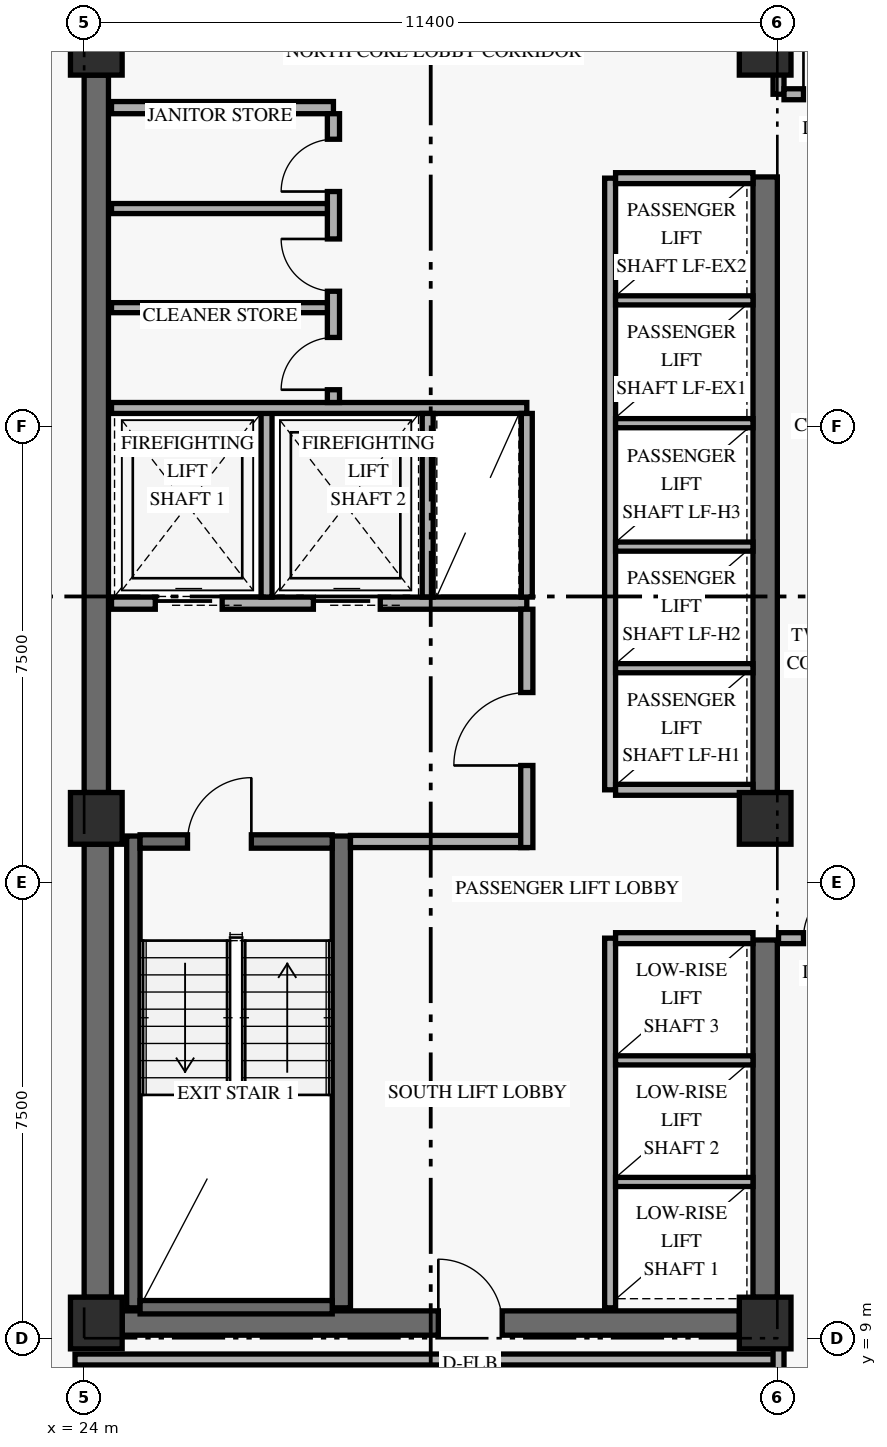
"""IFC4 building model, lengths in metres.
Left out: names, types, materials, properties, quantities, classifications, styles, units other than length and angle.
Written with IfcOpenShell. Run it as: python <this file> out.ifc"""

import sys

from ifc_helpers import new_model, si_unit, direction, frame, frame_2d, origin, origin_2d, place, context, subcontext, project, spatial, rectangle, extrude, element, fill, save


model = new_model("IFC4")
c1 = context("Model", 3, precision=1e-05, world=origin(), true_north=direction((0.0, 1.0)))
c2 = subcontext(c1, "Body", "Model", "MODEL_VIEW")
j1 = project(units=[si_unit("LENGTHUNIT", "METRE"), si_unit("PLANEANGLEUNIT", "RADIAN")], contexts=[c1])
p1 = place(None, origin())
s1 = spatial("IfcSite", under=j1, at=p1, CompositionType="ELEMENT")
p2 = place(p1, origin())
s2 = spatial("IfcBuilding", under=s1, at=p2, CompositionType="ELEMENT")
p3 = place(p2, frame((0.0, 0.0, 102.6)))
s3 = spatial("IfcBuildingStorey", under=s2, at=p3, CompositionType="ELEMENT", Elevation=102.6)
p4 = place(p3, frame((24.225, 9.675, 0.0), z_axis=(0.0, 0.0, 1.0), x_axis=(0.0, 1.0, 0.0)))
e1 = element("IfcWall", 1, at=p4, inside=s3, PredefinedType="SHEAR", context=c2, shape_type="SweptSolid", body=[
    extrude(rectangle(XDim=7.45, YDim=0.45, at=frame_2d((3.725, 0.0))), origin(), (0.0, 0.0, 1.0), 2.749),
])
p5 = place(p3, frame((24.2, 17.975, 0.0), z_axis=(0.0, 0.0, 1.0), x_axis=(0.0, 1.0, 0.0)))
e2 = element("IfcWall", 2, at=p5, inside=s3, PredefinedType="SHEAR", context=c2, shape_type="SweptSolid", body=[
    extrude(rectangle(XDim=11.8, YDim=0.4, at=frame_2d((5.9, 0.0))), origin(), (0.0, 0.0, 1.0), 2.749),
])
p6 = place(p3, frame((35.2, 9.675, 0.0), z_axis=(0.0, 0.0, 1.0), x_axis=(0.0, 1.0, 0.0)))
e3 = element("IfcWall", 3, at=p6, inside=s3, PredefinedType="SHEAR", context=c2, shape_type="SweptSolid", body=[
    extrude(rectangle(XDim=5.875, YDim=0.4, at=frame_2d((2.938, 0.0))), origin(), (0.0, 0.0, 1.0), 2.749),
])
p7 = place(p3, frame((35.2, 17.975, 0.0), z_axis=(0.0, 0.0, 1.0), x_axis=(0.0, 1.0, 0.0)))
e4 = element("IfcWall", 4, at=p7, inside=s3, PredefinedType="SHEAR", context=c2, shape_type="SweptSolid", body=[
    extrude(rectangle(XDim=10.125, YDim=0.4, at=frame_2d((5.062, 0.0))), origin(), (0.0, 0.0, 1.0), 2.749),
])
p8 = place(p3, frame((24.625, 9.25, 0.0), z_axis=(0.0, 0.0, 1.0), x_axis=(1.0, 0.0, 0.0)))
e5 = element("IfcWall", 5, at=p8, inside=s3, PredefinedType="SHEAR", context=c2, shape_type="SweptSolid", body=[
    extrude(rectangle(XDim=10.15, YDim=0.4, at=frame_2d((5.075, 0.0))), origin(), (0.0, 0.0, 1.0), 3.36),
])
p9 = place(p8, frame((5.2, 0.0, 0.0)))
e6 = element("IfcOpeningElement", 6, at=p9, cuts=e5, PredefinedType="OPENING", context=c2, shape_type="SweptSolid", body=[
    extrude(rectangle(XDim=1.05, YDim=2.15, at=frame_2d((0.525, 1.075))), frame((0.0, 0.21, 0.0), z_axis=(0.0, -1.0, 0.0), x_axis=(1.0, 0.0, 0.0)), (0.0, 0.0, 1.0), 0.42),
])
p10 = place(p3, frame((24.81, 9.5, 0.0), z_axis=(0.0, 0.0, 1.0), x_axis=(0.0, 1.0, 0.0)))
e7 = element("IfcWall", 7, at=p10, inside=s3, PredefinedType="SHEAR", context=c2, shape_type="SweptSolid", body=[
    extrude(rectangle(XDim=7.76, YDim=0.22, at=frame_2d((3.88, 0.0))), origin(), (0.0, 0.0, 1.0), 3.36),
])
p11 = place(p3, frame((28.23, 9.5, 0.0), z_axis=(0.0, 0.0, 1.0), x_axis=(0.0, 1.0, 0.0)))
e8 = element("IfcWall", 8, at=p11, inside=s3, PredefinedType="SHEAR", context=c2, shape_type="SweptSolid", body=[
    extrude(rectangle(XDim=7.76, YDim=0.3, at=frame_2d((3.88, 0.0))), origin(), (0.0, 0.0, 1.0), 3.36),
])
p12 = place(p3, frame((24.92, 9.51, 0.0), z_axis=(0.0, 0.0, 1.0), x_axis=(1.0, 0.0, 0.0)))
e9 = element("IfcWall", 9, at=p12, inside=s3, PredefinedType="SHEAR", context=c2, shape_type="SweptSolid", body=[
    extrude(rectangle(XDim=3.16, YDim=0.22, at=frame_2d((1.58, 0.0))), origin(), (0.0, 0.0, 1.0), 3.36),
])
p13 = place(p3, frame((24.92, 17.17, 0.0), z_axis=(0.0, 0.0, 1.0), x_axis=(1.0, 0.0, 0.0)))
e10 = element("IfcWall", 10, at=p13, inside=s3, PredefinedType="SHEAR", context=c2, shape_type="SweptSolid", body=[
    extrude(rectangle(XDim=3.16, YDim=0.22, at=frame_2d((1.58, 0.0))), origin(), (0.0, 0.0, 1.0), 3.36),
])
p14 = place(p13, frame((0.78, 0.0, 0.0)))
e11 = element("IfcOpeningElement", 11, at=p14, cuts=e10, PredefinedType="OPENING", context=c2, shape_type="SweptSolid", body=[
    extrude(rectangle(XDim=1.05, YDim=2.15, at=frame_2d((0.525, 1.075))), frame((0.0, 0.12, 0.0), z_axis=(0.0, -1.0, 0.0), x_axis=(1.0, 0.0, 0.0)), (0.0, 0.0, 1.0), 0.24),
])
for number, where, z_axis, x_axis in (
    (12, (24.2, 9.25, 0.0), (0.0, 0.0, 1.0), (1.0, 0.0, 0.0)),
    (13, (24.2, 17.55, 0.0), (0.0, 0.0, 1.0), (1.0, 0.0, 0.0)),
    (14, (24.2, 30.2, 0.0), (0.0, 0.0, 1.0), (1.0, 0.0, 0.0)),
    (15, (35.2, 9.25, 0.0), (0.0, 0.0, 1.0), (1.0, 0.0, 0.0)),
    (16, (35.2, 17.55, 0.0), (0.0, 0.0, 1.0), (1.0, 0.0, 0.0)),
    (17, (35.2, 30.2, 0.0), (0.0, 0.0, 1.0), (1.0, 0.0, 0.0)),
):
    element("IfcColumn", number, at=place(p3, frame(where, z_axis=z_axis, x_axis=x_axis)), inside=s3, PredefinedType="COLUMN", context=c2, shape_type="SweptSolid", body=[
        extrude(rectangle(XDim=0.85, YDim=0.85, at=origin_2d()), origin(), (0.0, 0.0, 1.0), 3.6),
    ])
p15 = place(p3, frame((24.45, 21.09, 0.0), z_axis=(0.0, 0.0, 1.0), x_axis=(1.0, 0.0, 0.0)))
e18 = element("IfcWall", 18, at=p15, inside=s3, PredefinedType="STANDARD", context=c2, shape_type="SweptSolid", body=[
    extrude(rectangle(XDim=6.83, YDim=0.2, at=frame_2d((3.415, 0.0))), origin(), (0.0, 0.0, 1.0), 3.36),
])
p16 = place(p15, frame((0.72, 0.0, 0.0)))
e19 = element("IfcOpeningElement", 19, at=p16, cuts=e18, PredefinedType="OPENING", context=c2, shape_type="SweptSolid", body=[
    extrude(rectangle(XDim=1.1, YDim=2.2, at=frame_2d((0.55, 1.1))), frame((0.0, 0.11, 0.0), z_axis=(0.0, -1.0, 0.0), x_axis=(1.0, 0.0, 0.0)), (0.0, 0.0, 1.0), 0.22),
])
p17 = place(p15, frame((3.32, 0.0, 0.0)))
e20 = element("IfcOpeningElement", 20, at=p17, cuts=e18, PredefinedType="OPENING", context=c2, shape_type="SweptSolid", body=[
    extrude(rectangle(XDim=1.1, YDim=2.2, at=frame_2d((0.55, 1.1))), frame((0.0, 0.11, 0.0), z_axis=(0.0, -1.0, 0.0), x_axis=(1.0, 0.0, 0.0)), (0.0, 0.0, 1.0), 0.22),
])
p18 = place(p3, frame((28.38, 17.17, 0.0), z_axis=(0.0, 0.0, 1.0), x_axis=(1.0, 0.0, 0.0)))
e21 = element("IfcWall", 21, at=p18, inside=s3, PredefinedType="STANDARD", context=c2, shape_type="SweptSolid", body=[
    extrude(rectangle(XDim=2.9, YDim=0.2, at=frame_2d((1.45, 0.0))), origin(), (0.0, 0.0, 1.0), 3.36),
])
p19 = place(p3, frame((31.28, 17.07, 0.0), z_axis=(0.0, 0.0, 1.0), x_axis=(0.0, 1.0, 0.0)))
e22 = element("IfcWall", 22, at=p19, inside=s3, PredefinedType="STANDARD", context=c2, shape_type="SweptSolid", body=[
    extrude(rectangle(XDim=3.92, YDim=0.2, at=frame_2d((1.96, 0.0))), origin(), (0.0, 0.0, 1.0), 2.731),
])
p20 = place(p19, frame((1.35, 0.0, 0.0)))
e23 = element("IfcOpeningElement", 23, at=p20, cuts=e22, PredefinedType="OPENING", context=c2, shape_type="SweptSolid", body=[
    extrude(rectangle(XDim=1.2, YDim=2.15, at=frame_2d((0.6, 1.075))), frame((0.0, 0.11, 0.0), z_axis=(0.0, -1.0, 0.0), x_axis=(1.0, 0.0, 0.0)), (0.0, 0.0, 1.0), 0.22),
])
p21 = place(p3, frame((27.0, 21.19, 0.0), z_axis=(0.0, 0.0, 1.0), x_axis=(0.0, 1.0, 0.0)))
e24 = element("IfcWall", 24, at=p21, inside=s3, PredefinedType="STANDARD", context=c2, shape_type="SweptSolid", body=[
    extrude(rectangle(XDim=3.11, YDim=0.18, at=frame_2d((1.555, 0.0))), origin(), (0.0, 0.0, 1.0), 3.36),
])
p22 = place(p3, frame((24.45, 24.3, 0.0), z_axis=(0.0, 0.0, 1.0), x_axis=(1.0, 0.0, 0.0)))
e25 = element("IfcWall", 25, at=p22, inside=s3, PredefinedType="STANDARD", context=c2, shape_type="SweptSolid", body=[
    extrude(rectangle(XDim=6.83, YDim=0.18, at=frame_2d((3.415, 0.0))), origin(), (0.0, 0.0, 1.0), 3.36),
])
for number, where, z_axis, x_axis in (
    (26, (29.65, 21.19, 0.0), (0.0, 0.0, 1.0), (0.0, 1.0, 0.0)),
    (27, (31.28, 21.19, 0.0), (0.0, 0.0, 1.0), (0.0, 1.0, 0.0)),
):
    element("IfcWall", number, at=place(p3, frame(where, z_axis=z_axis, x_axis=x_axis)), inside=s3, PredefinedType="STANDARD", context=c2, shape_type="SweptSolid", body=[
        extrude(rectangle(XDim=3.02, YDim=0.18, at=frame_2d((1.51, 0.0))), origin(), (0.0, 0.0, 1.0), 3.36),
    ])
p23 = place(p3, frame((24.45, 29.24, 0.0), z_axis=(0.0, 0.0, 1.0), x_axis=(1.0, 0.0, 0.0)))
e28 = element("IfcWall", 28, at=p23, inside=s3, PredefinedType="STANDARD", context=c2, shape_type="SweptSolid", body=[
    extrude(rectangle(XDim=3.65, YDim=0.2, at=frame_2d((1.825, 0.0))), origin(), (0.0, 0.0, 1.0), 3.36),
])
p24 = place(p3, frame((28.1, 24.39, 0.0), z_axis=(0.0, 0.0, 1.0), x_axis=(0.0, 1.0, 0.0)))
e29 = element("IfcWall", 29, at=p24, inside=s3, PredefinedType="STANDARD", context=c2, shape_type="SweptSolid", body=[
    extrude(rectangle(XDim=4.75, YDim=0.2, at=frame_2d((2.375, 0.0))), origin(), (0.0, 0.0, 1.0), 3.36),
])
p25 = place(p24, frame((0.21, 0.0, 0.0)))
e30 = element("IfcOpeningElement", 30, at=p25, cuts=e29, PredefinedType="OPENING", context=c2, shape_type="SweptSolid", body=[
    extrude(rectangle(XDim=0.86, YDim=2.1, at=frame_2d((0.43, 1.05))), frame((0.0, 0.11, 0.0), z_axis=(0.0, -1.0, 0.0), x_axis=(1.0, 0.0, 0.0)), (0.0, 0.0, 1.0), 0.22),
])
p26 = place(p24, frame((1.83, 0.0, 0.0)))
e31 = element("IfcOpeningElement", 31, at=p26, cuts=e29, PredefinedType="OPENING", context=c2, shape_type="SweptSolid", body=[
    extrude(rectangle(XDim=0.86, YDim=2.1, at=frame_2d((0.43, 1.05))), frame((0.0, 0.11, 0.0), z_axis=(0.0, -1.0, 0.0), x_axis=(1.0, 0.0, 0.0)), (0.0, 0.0, 1.0), 0.22),
])
p27 = place(p24, frame((3.47, 0.0, 0.0)))
e32 = element("IfcOpeningElement", 32, at=p27, cuts=e29, PredefinedType="OPENING", context=c2, shape_type="SweptSolid", body=[
    extrude(rectangle(XDim=0.86, YDim=2.1, at=frame_2d((0.43, 1.05))), frame((0.0, 0.11, 0.0), z_axis=(0.0, -1.0, 0.0), x_axis=(1.0, 0.0, 0.0)), (0.0, 0.0, 1.0), 0.22),
])
for number, where, z_axis, x_axis in (
    (33, (24.45, 25.95, 0.0), (0.0, 0.0, 1.0), (1.0, 0.0, 0.0)),
    (34, (24.45, 27.58, 0.0), (0.0, 0.0, 1.0), (1.0, 0.0, 0.0)),
):
    element("IfcWall", number, at=place(p3, frame(where, z_axis=z_axis, x_axis=x_axis)), inside=s3, PredefinedType="PARTITIONING", context=c2, shape_type="SweptSolid", body=[
        extrude(rectangle(XDim=3.55, YDim=0.165, at=frame_2d((1.775, 0.0))), origin(), (0.0, 0.0, 1.0), 3.36),
    ])
p28 = place(p3, frame((32.65, 9.5, 0.0), z_axis=(0.0, 0.0, 1.0), x_axis=(0.0, 1.0, 0.0)))
e35 = element("IfcWall", 35, at=p28, inside=s3, PredefinedType="STANDARD", context=c2, shape_type="SweptSolid", body=[
    extrude(rectangle(XDim=6.08, YDim=0.18, at=frame_2d((3.04, 0.0))), origin(), (0.0, 0.0, 1.0), 3.36),
])
p29 = place(p3, frame((32.74, 15.58, 0.0), z_axis=(0.0, 0.0, 1.0), x_axis=(1.0, 0.0, 0.0)))
e36 = element("IfcWall", 36, at=p29, inside=s3, PredefinedType="STANDARD", context=c2, shape_type="SweptSolid", body=[
    extrude(rectangle(XDim=2.26, YDim=0.18, at=frame_2d((1.13, 0.0))), origin(), (0.0, 0.0, 1.0), 3.36),
])
for number, where, z_axis, x_axis in (
    (37, (32.74, 11.57, 0.0), (0.0, 0.0, 1.0), (1.0, 0.0, 0.0)),
    (38, (32.74, 13.57, 0.0), (0.0, 0.0, 1.0), (1.0, 0.0, 0.0)),
):
    element("IfcWall", number, at=place(p3, frame(where, z_axis=z_axis, x_axis=x_axis)), inside=s3, PredefinedType="STANDARD", context=c2, shape_type="SweptSolid", body=[
        extrude(rectangle(XDim=2.26, YDim=0.15, at=frame_2d((1.13, 0.0))), origin(), (0.0, 0.0, 1.0), 3.36),
    ])
p30 = place(p3, frame((32.65, 18.02, 0.0), z_axis=(0.0, 0.0, 1.0), x_axis=(0.0, 1.0, 0.0)))
e39 = element("IfcWall", 39, at=p30, inside=s3, PredefinedType="STANDARD", context=c2, shape_type="SweptSolid", body=[
    extrude(rectangle(XDim=10.06, YDim=0.18, at=frame_2d((5.03, 0.0))), origin(), (0.0, 0.0, 1.0), 3.36),
])
for number, where, z_axis, x_axis in (
    (40, (32.74, 18.02, 0.0), (0.0, 0.0, 1.0), (1.0, 0.0, 0.0)),
    (41, (32.74, 28.08, 0.0), (0.0, 0.0, 1.0), (1.0, 0.0, 0.0)),
):
    element("IfcWall", number, at=place(p3, frame(where, z_axis=z_axis, x_axis=x_axis)), inside=s3, PredefinedType="STANDARD", context=c2, shape_type="SweptSolid", body=[
        extrude(rectangle(XDim=2.26, YDim=0.18, at=frame_2d((1.13, 0.0))), origin(), (0.0, 0.0, 1.0), 3.36),
    ])
for number, where, z_axis, x_axis in (
    (42, (32.74, 20.02, 0.0), (0.0, 0.0, 1.0), (1.0, 0.0, 0.0)),
    (43, (32.74, 22.02, 0.0), (0.0, 0.0, 1.0), (1.0, 0.0, 0.0)),
    (44, (32.74, 24.05, 0.0), (0.0, 0.0, 1.0), (1.0, 0.0, 0.0)),
    (45, (32.74, 26.07, 0.0), (0.0, 0.0, 1.0), (1.0, 0.0, 0.0)),
):
    element("IfcWall", number, at=place(p3, frame(where, z_axis=z_axis, x_axis=x_axis)), inside=s3, PredefinedType="STANDARD", context=c2, shape_type="SweptSolid", body=[
        extrude(rectangle(XDim=2.26, YDim=0.15, at=frame_2d((1.13, 0.0))), origin(), (0.0, 0.0, 1.0), 3.36),
    ])
p31 = place(p3, frame((35.42, 15.58, 0.0), z_axis=(0.0, 0.0, 1.0), x_axis=(1.0, 0.0, 0.0)))
e46 = element("IfcWall", 46, at=p31, inside=s3, PredefinedType="STANDARD", context=c2, shape_type="SweptSolid", body=[
    extrude(rectangle(XDim=11.18, YDim=0.18, at=frame_2d((5.59, 0.0))), origin(), (0.0, 0.0, 1.0), 2.731),
])
p32 = place(p31, frame((0.41, 0.0, 0.0)))
e47 = element("IfcOpeningElement", 47, at=p32, cuts=e46, PredefinedType="OPENING", context=c2, shape_type="SweptSolid", body=[
    extrude(rectangle(XDim=0.92, YDim=2.15, at=frame_2d((0.46, 1.075))), frame((0.0, 0.1, 0.0), z_axis=(0.0, -1.0, 0.0), x_axis=(1.0, 0.0, 0.0)), (0.0, 0.0, 1.0), 0.2),
])
p33 = place(p3, frame((35.42, 29.46, 0.0), z_axis=(0.0, 0.0, 1.0), x_axis=(0.0, 1.0, 0.0)))
e48 = element("IfcWall", 48, at=p33, inside=s3, PredefinedType="STANDARD", context=c2, shape_type="SweptSolid", body=[
    extrude(rectangle(XDim=1.89, YDim=0.18, at=frame_2d((0.945, 0.0))), origin(), (0.0, 0.0, 1.0), 2.731),
])
p34 = place(p3, frame((35.51, 29.46, 0.0), z_axis=(0.0, 0.0, 1.0), x_axis=(1.0, 0.0, 0.0)))
e49 = element("IfcWall", 49, at=p34, inside=s3, PredefinedType="STANDARD", context=c2, shape_type="SweptSolid", body=[
    extrude(rectangle(XDim=11.09, YDim=0.18, at=frame_2d((5.545, 0.0))), origin(), (0.0, 0.0, 1.0), 2.731),
])
p35 = place(p34, frame((0.32, 0.0, 0.0)))
e50 = element("IfcOpeningElement", 50, at=p35, cuts=e49, PredefinedType="OPENING", context=c2, shape_type="SweptSolid", body=[
    extrude(rectangle(XDim=0.92, YDim=2.15, at=frame_2d((0.46, 1.075))), frame((0.0, 0.1, 0.0), z_axis=(0.0, -1.0, 0.0), x_axis=(1.0, 0.0, 0.0)), (0.0, 0.0, 1.0), 0.2),
])
p36 = place(p3, frame((23.85, 8.65, 0.0), z_axis=(0.0, 0.0, 1.0), x_axis=(1.0, 0.0, 0.0)))
e51 = element("IfcWall", 51, at=p36, inside=s3, PredefinedType="STANDARD", context=c2, shape_type="SweptSolid", body=[
    extrude(rectangle(XDim=11.57, YDim=0.18, at=frame_2d((5.785, 0.0))), origin(), (0.0, 0.0, 1.0), 2.731),
])
p37 = place(p3, frame((35.42, 2.98, 0.0), z_axis=(0.0, 0.0, 1.0), x_axis=(0.0, 1.0, 0.0)))
e52 = element("IfcWall", 52, at=p37, inside=s3, PredefinedType="PARTITIONING", context=c2, shape_type="SweptSolid", body=[
    extrude(rectangle(XDim=6.27, YDim=0.18, at=frame_2d((3.135, 0.0))), origin(), (0.0, 0.0, 1.0), 2.731),
])
p38 = place(p14, frame((1.05, 0.0, 0.0), z_axis=(0.0, 0.0, 1.0), x_axis=(-1.0, 0.0, 0.0)))
e53 = element("IfcDoor", 53, at=p38, inside=s3, OperationType="SINGLE_SWING_LEFT", PredefinedType="DOOR", context=c2, shape_type="SweptSolid", body=[
    extrude(rectangle(XDim=1.05, YDim=2.15, at=frame_2d((0.525, 1.075))), frame((0.0, 0.025, 0.0), z_axis=(0.0, -1.0, 0.0), x_axis=(1.0, 0.0, 0.0)), (0.0, 0.0, 1.0), 0.05),
])
fill(e11, e53)
p39 = place(p16, origin())
e54 = element("IfcDoor", 54, at=p39, inside=s3, OperationType="SLIDING_TO_LEFT", PredefinedType="DOOR", context=c2, shape_type="SweptSolid", body=[
    extrude(rectangle(XDim=1.1, YDim=2.2, at=frame_2d((0.55, 1.1))), frame((0.0, 0.025, 0.0), z_axis=(0.0, -1.0, 0.0), x_axis=(1.0, 0.0, 0.0)), (0.0, 0.0, 1.0), 0.05),
])
fill(e19, e54)
p40 = place(p17, origin())
e55 = element("IfcDoor", 55, at=p40, inside=s3, OperationType="SLIDING_TO_LEFT", PredefinedType="DOOR", context=c2, shape_type="SweptSolid", body=[
    extrude(rectangle(XDim=1.1, YDim=2.2, at=frame_2d((0.55, 1.1))), frame((0.0, 0.025, 0.0), z_axis=(0.0, -1.0, 0.0), x_axis=(1.0, 0.0, 0.0)), (0.0, 0.0, 1.0), 0.05),
])
fill(e20, e55)
p41 = place(p20, origin())
e56 = element("IfcDoor", 56, at=p41, inside=s3, OperationType="SINGLE_SWING_LEFT", PredefinedType="DOOR", context=c2, shape_type="SweptSolid", body=[
    extrude(rectangle(XDim=1.2, YDim=2.15, at=frame_2d((0.6, 1.075))), frame((0.0, 0.025, 0.0), z_axis=(0.0, -1.0, 0.0), x_axis=(1.0, 0.0, 0.0)), (0.0, 0.0, 1.0), 0.05),
])
fill(e23, e56)
p42 = place(p25, origin())
e57 = element("IfcDoor", 57, at=p42, inside=s3, OperationType="SINGLE_SWING_LEFT", PredefinedType="DOOR", context=c2, shape_type="SweptSolid", body=[
    extrude(rectangle(XDim=0.86, YDim=2.1, at=frame_2d((0.43, 1.05))), frame((0.0, 0.025, 0.0), z_axis=(0.0, -1.0, 0.0), x_axis=(1.0, 0.0, 0.0)), (0.0, 0.0, 1.0), 0.05),
])
fill(e30, e57)
p43 = place(p26, origin())
e58 = element("IfcDoor", 58, at=p43, inside=s3, OperationType="SINGLE_SWING_RIGHT", PredefinedType="DOOR", context=c2, shape_type="SweptSolid", body=[
    extrude(rectangle(XDim=0.86, YDim=2.1, at=frame_2d((0.43, 1.05))), frame((0.0, 0.025, 0.0), z_axis=(0.0, -1.0, 0.0), x_axis=(1.0, 0.0, 0.0)), (0.0, 0.0, 1.0), 0.05),
])
fill(e31, e58)
p44 = place(p27, origin())
e59 = element("IfcDoor", 59, at=p44, inside=s3, OperationType="SINGLE_SWING_LEFT", PredefinedType="DOOR", context=c2, shape_type="SweptSolid", body=[
    extrude(rectangle(XDim=0.86, YDim=2.1, at=frame_2d((0.43, 1.05))), frame((0.0, 0.025, 0.0), z_axis=(0.0, -1.0, 0.0), x_axis=(1.0, 0.0, 0.0)), (0.0, 0.0, 1.0), 0.05),
])
fill(e32, e59)
p45 = place(p9, origin())
e60 = element("IfcDoor", 60, at=p45, inside=s3, OperationType="SINGLE_SWING_LEFT", PredefinedType="DOOR", context=c2, shape_type="SweptSolid", body=[
    extrude(rectangle(XDim=1.05, YDim=2.15, at=frame_2d((0.525, 1.075))), frame((0.0, 0.025, 0.0), z_axis=(0.0, -1.0, 0.0), x_axis=(1.0, 0.0, 0.0)), (0.0, 0.0, 1.0), 0.05),
])
fill(e6, e60)
p46 = place(p32, origin())
e61 = element("IfcDoor", 61, at=p46, inside=s3, OperationType="SINGLE_SWING_RIGHT", PredefinedType="DOOR", context=c2, shape_type="SweptSolid", body=[
    extrude(rectangle(XDim=0.92, YDim=2.15, at=frame_2d((0.46, 1.075))), frame((0.0, 0.025, 0.0), z_axis=(0.0, -1.0, 0.0), x_axis=(1.0, 0.0, 0.0)), (0.0, 0.0, 1.0), 0.05),
])
fill(e47, e61)
p47 = place(p35, origin())
e62 = element("IfcDoor", 62, at=p47, inside=s3, OperationType="SINGLE_SWING_LEFT", PredefinedType="DOOR", context=c2, shape_type="SweptSolid", body=[
    extrude(rectangle(XDim=0.92, YDim=2.15, at=frame_2d((0.46, 1.075))), frame((0.0, 0.025, 0.0), z_axis=(0.0, -1.0, 0.0), x_axis=(1.0, 0.0, 0.0)), (0.0, 0.0, 1.0), 0.05),
])
fill(e50, e62)
save(model, sys.argv[1])
